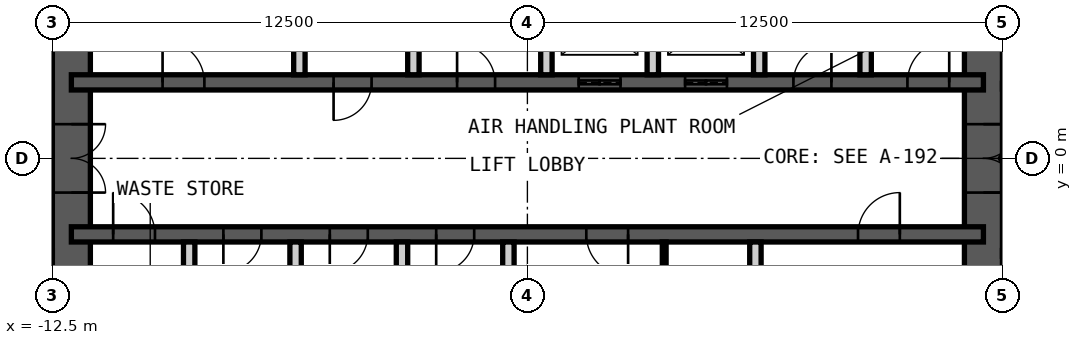
"""IFC4 building model, lengths in metres.
Left out: names, types, materials, properties, quantities, classifications, styles, units other than length and angle.
Written with IfcOpenShell. Run it as: python <this file> out.ifc"""

import sys

from ifc_helpers import new_model, si_unit, direction, frame, frame_2d, origin, place, context, subcontext, project, spatial, rectangle, extrude, element, fill, save


model = new_model("IFC4")
c1 = context("Model", 3, precision=1e-05, world=origin(), true_north=direction((0.0, 1.0)))
c2 = subcontext(c1, "Body", "Model", "MODEL_VIEW")
j1 = project(units=[si_unit("LENGTHUNIT", "METRE"), si_unit("PLANEANGLEUNIT", "RADIAN")], contexts=[c1])
p1 = place(None, origin())
s1 = spatial("IfcSite", under=j1, at=p1, CompositionType="ELEMENT")
p2 = place(p1, origin())
s2 = spatial("IfcBuilding", under=s1, at=p2, CompositionType="ELEMENT")
p3 = place(p2, frame((0.0, 0.0, 291.4)))
s3 = spatial("IfcBuildingStorey", under=s2, at=p3, CompositionType="ELEMENT", Elevation=291.4)
p4 = place(p3, frame((12.0, -9.0, 0.0), z_axis=(0.0, 0.0, 1.0), x_axis=(0.0, 1.0, 0.0)))
e1 = element("IfcWall", 1, at=p4, inside=s3, PredefinedType="SHEAR", context=c2, shape_type="SweptSolid", body=[
    extrude(rectangle(XDim=18.0, YDim=1.0, at=frame_2d((9.0, 0.0))), origin(), (0.0, 0.0, 1.0), 4.2),
])
p5 = place(p4, frame((8.1, 0.0, 0.0)))
e2 = element("IfcOpeningElement", 2, at=p5, cuts=e1, PredefinedType="OPENING", context=c2, shape_type="SweptSolid", body=[
    extrude(rectangle(XDim=1.8, YDim=2.1, at=frame_2d((0.9, 1.05))), frame((0.0, 0.51, 0.0), z_axis=(0.0, -1.0, 0.0), x_axis=(1.0, 0.0, 0.0)), (0.0, 0.0, 1.0), 1.02),
])
p6 = place(p3, frame((-12.0, -9.0, 0.0), z_axis=(0.0, 0.0, 1.0), x_axis=(0.0, 1.0, 0.0)))
e3 = element("IfcWall", 3, at=p6, inside=s3, PredefinedType="SHEAR", context=c2, shape_type="SweptSolid", body=[
    extrude(rectangle(XDim=18.0, YDim=1.0, at=frame_2d((9.0, 0.0))), origin(), (0.0, 0.0, 1.0), 4.2),
])
p7 = place(p6, frame((8.1, 0.0, 0.0)))
e4 = element("IfcOpeningElement", 4, at=p7, cuts=e3, PredefinedType="OPENING", context=c2, shape_type="SweptSolid", body=[
    extrude(rectangle(XDim=1.8, YDim=2.1, at=frame_2d((0.9, 1.05))), frame((0.0, 0.51, 0.0), z_axis=(0.0, -1.0, 0.0), x_axis=(1.0, 0.0, 0.0)), (0.0, 0.0, 1.0), 1.02),
])
p8 = place(p3, frame((-12.0, 2.0, 0.0), z_axis=(0.0, 0.0, 1.0), x_axis=(1.0, 0.0, 0.0)))
e5 = element("IfcWall", 5, at=p8, inside=s3, PredefinedType="SHEAR", context=c2, shape_type="SweptSolid", body=[
    extrude(rectangle(XDim=24.0, YDim=0.4, at=frame_2d((12.0, 0.0))), origin(), (0.0, 0.0, 1.0), 4.2),
])
p9 = place(p8, frame((2.4, 0.0, 0.0)))
e6 = element("IfcOpeningElement", 6, at=p9, cuts=e5, PredefinedType="OPENING", context=c2, shape_type="SweptSolid", body=[
    extrude(rectangle(XDim=1.1, YDim=2.1, at=frame_2d((0.55, 1.05))), frame((0.0, 0.21, 0.0), z_axis=(0.0, -1.0, 0.0), x_axis=(1.0, 0.0, 0.0)), (0.0, 0.0, 1.0), 0.42),
])
p10 = place(p8, frame((22.0, 0.0, 0.0)))
e7 = element("IfcOpeningElement", 7, at=p10, cuts=e5, PredefinedType="OPENING", context=c2, shape_type="SweptSolid", body=[
    extrude(rectangle(XDim=1.1, YDim=2.1, at=frame_2d((0.55, 1.05))), frame((0.0, 0.21, 0.0), z_axis=(0.0, -1.0, 0.0), x_axis=(1.0, 0.0, 0.0)), (0.0, 0.0, 1.0), 0.42),
])
p11 = place(p8, frame((10.15, 0.0, 0.0)))
e8 = element("IfcOpeningElement", 8, at=p11, cuts=e5, PredefinedType="OPENING", context=c2, shape_type="SweptSolid", body=[
    extrude(rectangle(XDim=1.0, YDim=2.1, at=frame_2d((0.5, 1.05))), frame((0.0, 0.21, 0.0), z_axis=(0.0, -1.0, 0.0), x_axis=(1.0, 0.0, 0.0)), (0.0, 0.0, 1.0), 0.42),
])
p12 = place(p8, frame((6.9, 0.0, 0.0)))
e9 = element("IfcOpeningElement", 9, at=p12, cuts=e5, PredefinedType="OPENING", context=c2, shape_type="SweptSolid", body=[
    extrude(rectangle(XDim=1.0, YDim=2.1, at=frame_2d((0.5, 1.05))), frame((0.0, 0.21, 0.0), z_axis=(0.0, -1.0, 0.0), x_axis=(1.0, 0.0, 0.0)), (0.0, 0.0, 1.0), 0.42),
])
p13 = place(p8, frame((13.35, 0.0, 0.0)))
e10 = element("IfcOpeningElement", 10, at=p13, cuts=e5, PredefinedType="OPENING", context=c2, shape_type="SweptSolid", body=[
    extrude(rectangle(XDim=1.1, YDim=2.4, at=frame_2d((0.55, 1.2))), frame((0.0, 0.21, 0.0), z_axis=(0.0, -1.0, 0.0), x_axis=(1.0, 0.0, 0.0)), (0.0, 0.0, 1.0), 0.42),
])
p14 = place(p8, frame((16.15, 0.0, 0.0)))
e11 = element("IfcOpeningElement", 11, at=p14, cuts=e5, PredefinedType="OPENING", context=c2, shape_type="SweptSolid", body=[
    extrude(rectangle(XDim=1.1, YDim=2.4, at=frame_2d((0.55, 1.2))), frame((0.0, 0.21, 0.0), z_axis=(0.0, -1.0, 0.0), x_axis=(1.0, 0.0, 0.0)), (0.0, 0.0, 1.0), 0.42),
])
p15 = place(p8, frame((19.0, 0.0, 0.0)))
e12 = element("IfcOpeningElement", 12, at=p15, cuts=e5, PredefinedType="OPENING", context=c2, shape_type="SweptSolid", body=[
    extrude(rectangle(XDim=1.0, YDim=2.1, at=frame_2d((0.5, 1.05))), frame((0.0, 0.21, 0.0), z_axis=(0.0, -1.0, 0.0), x_axis=(1.0, 0.0, 0.0)), (0.0, 0.0, 1.0), 0.42),
])
p16 = place(p3, frame((-12.0, -2.0, 0.0), z_axis=(0.0, 0.0, 1.0), x_axis=(1.0, 0.0, 0.0)))
e13 = element("IfcWall", 13, at=p16, inside=s3, PredefinedType="SHEAR", context=c2, shape_type="SweptSolid", body=[
    extrude(rectangle(XDim=24.0, YDim=0.4, at=frame_2d((12.0, 0.0))), origin(), (0.0, 0.0, 1.0), 4.2),
])
p17 = place(p16, frame((1.1, 0.0, 0.0)))
e14 = element("IfcOpeningElement", 14, at=p17, cuts=e13, PredefinedType="OPENING", context=c2, shape_type="SweptSolid", body=[
    extrude(rectangle(XDim=1.1, YDim=2.1, at=frame_2d((0.55, 1.05))), frame((0.0, 0.21, 0.0), z_axis=(0.0, -1.0, 0.0), x_axis=(1.0, 0.0, 0.0)), (0.0, 0.0, 1.0), 0.42),
])
p18 = place(p16, frame((13.55, 0.0, 0.0)))
e15 = element("IfcOpeningElement", 15, at=p18, cuts=e13, PredefinedType="OPENING", context=c2, shape_type="SweptSolid", body=[
    extrude(rectangle(XDim=1.1, YDim=2.1, at=frame_2d((0.55, 1.05))), frame((0.0, 0.21, 0.0), z_axis=(0.0, -1.0, 0.0), x_axis=(1.0, 0.0, 0.0)), (0.0, 0.0, 1.0), 0.42),
])
p19 = place(p16, frame((20.7, 0.0, 0.0)))
e16 = element("IfcOpeningElement", 16, at=p19, cuts=e13, PredefinedType="OPENING", context=c2, shape_type="SweptSolid", body=[
    extrude(rectangle(XDim=1.1, YDim=2.1, at=frame_2d((0.55, 1.05))), frame((0.0, 0.21, 0.0), z_axis=(0.0, -1.0, 0.0), x_axis=(1.0, 0.0, 0.0)), (0.0, 0.0, 1.0), 0.42),
])
p20 = place(p16, frame((4.0, 0.0, 0.0)))
e17 = element("IfcOpeningElement", 17, at=p20, cuts=e13, PredefinedType="OPENING", context=c2, shape_type="SweptSolid", body=[
    extrude(rectangle(XDim=1.0, YDim=2.1, at=frame_2d((0.5, 1.05))), frame((0.0, 0.21, 0.0), z_axis=(0.0, -1.0, 0.0), x_axis=(1.0, 0.0, 0.0)), (0.0, 0.0, 1.0), 0.42),
])
p21 = place(p16, frame((6.8, 0.0, 0.0)))
e18 = element("IfcOpeningElement", 18, at=p21, cuts=e13, PredefinedType="OPENING", context=c2, shape_type="SweptSolid", body=[
    extrude(rectangle(XDim=1.0, YDim=2.1, at=frame_2d((0.5, 1.05))), frame((0.0, 0.21, 0.0), z_axis=(0.0, -1.0, 0.0), x_axis=(1.0, 0.0, 0.0)), (0.0, 0.0, 1.0), 0.42),
])
p22 = place(p16, frame((9.6, 0.0, 0.0)))
e19 = element("IfcOpeningElement", 19, at=p22, cuts=e13, PredefinedType="OPENING", context=c2, shape_type="SweptSolid", body=[
    extrude(rectangle(XDim=1.0, YDim=2.1, at=frame_2d((0.5, 1.05))), frame((0.0, 0.21, 0.0), z_axis=(0.0, -1.0, 0.0), x_axis=(1.0, 0.0, 0.0)), (0.0, 0.0, 1.0), 0.42),
])
for number, where, z_axis, x_axis in (
    (20, (-6.0, 2.2, 0.0), (0.0, 0.0, 1.0), (0.0, 1.0, 0.0)),
    (21, (-3.0, 2.2, 0.0), (0.0, 0.0, 1.0), (0.0, 1.0, 0.0)),
    (22, (0.5, 2.2, 0.0), (0.0, 0.0, 1.0), (0.0, 1.0, 0.0)),
    (23, (3.3, 2.2, 0.0), (0.0, 0.0, 1.0), (0.0, 1.0, 0.0)),
    (24, (6.1, 2.2, 0.0), (0.0, 0.0, 1.0), (0.0, 1.0, 0.0)),
    (25, (8.9, 2.2, 0.0), (0.0, 0.0, 1.0), (0.0, 1.0, 0.0)),
    (26, (-8.9, -4.85, 0.0), (0.0, 0.0, 1.0), (0.0, 1.0, 0.0)),
    (27, (-6.1, -4.85, 0.0), (0.0, 0.0, 1.0), (0.0, 1.0, 0.0)),
    (28, (-3.3, -4.85, 0.0), (0.0, 0.0, 1.0), (0.0, 1.0, 0.0)),
    (29, (-0.5, -4.85, 0.0), (0.0, 0.0, 1.0), (0.0, 1.0, 0.0)),
    (30, (6.0, -4.85, 0.0), (0.0, 0.0, 1.0), (0.0, 1.0, 0.0)),
):
    element("IfcWall", number, at=place(p3, frame(where, z_axis=z_axis, x_axis=x_axis)), inside=s3, PredefinedType="PARTITIONING", context=c2, shape_type="SweptSolid", body=[
        extrude(rectangle(XDim=2.65, YDim=0.3, at=frame_2d((1.325, 0.0))), origin(), (0.0, 0.0, 1.0), 3.98),
    ])
p23 = place(p3, frame((3.6, -4.85, 0.0), z_axis=(0.0, 0.0, 1.0), x_axis=(0.0, 1.0, 0.0)))
e31 = element("IfcWall", 31, at=p23, inside=s3, PredefinedType="PARTITIONING", context=c2, shape_type="SweptSolid", body=[
    extrude(rectangle(XDim=2.65, YDim=0.1, at=frame_2d((1.325, 0.0))), origin(), (0.0, 0.0, 1.0), 3.98),
])
p24 = place(p23, frame((0.1, 0.0, 0.0)))
e32 = element("IfcOpeningElement", 32, at=p24, cuts=e31, PredefinedType="OPENING", context=c2, shape_type="SweptSolid", body=[
    extrude(rectangle(XDim=1.0, YDim=2.4, at=frame_2d((0.5, 1.2))), frame((0.0, 0.06, 0.0), z_axis=(0.0, -1.0, 0.0), x_axis=(1.0, 0.0, 0.0)), (0.0, 0.0, 1.0), 0.12),
])
p25 = place(p9, origin())
e33 = element("IfcDoor", 33, at=p25, inside=s3, OperationType="SINGLE_SWING_RIGHT", PredefinedType="DOOR", context=c2, shape_type="SweptSolid", body=[
    extrude(rectangle(XDim=1.1, YDim=2.1, at=frame_2d((0.55, 1.05))), frame((0.0, 0.025, 0.0), z_axis=(0.0, -1.0, 0.0), x_axis=(1.0, 0.0, 0.0)), (0.0, 0.0, 1.0), 0.05),
])
fill(e6, e33)
p26 = place(p17, origin())
e34 = element("IfcDoor", 34, at=p26, inside=s3, OperationType="SINGLE_SWING_RIGHT", PredefinedType="DOOR", context=c2, shape_type="SweptSolid", body=[
    extrude(rectangle(XDim=1.1, YDim=2.1, at=frame_2d((0.55, 1.05))), frame((0.0, 0.025, 0.0), z_axis=(0.0, -1.0, 0.0), x_axis=(1.0, 0.0, 0.0)), (0.0, 0.0, 1.0), 0.05),
])
fill(e14, e34)
p27 = place(p10, origin())
e35 = element("IfcDoor", 35, at=p27, inside=s3, OperationType="SINGLE_SWING_LEFT", PredefinedType="DOOR", context=c2, shape_type="SweptSolid", body=[
    extrude(rectangle(XDim=1.1, YDim=2.1, at=frame_2d((0.55, 1.05))), frame((0.0, 0.025, 0.0), z_axis=(0.0, -1.0, 0.0), x_axis=(1.0, 0.0, 0.0)), (0.0, 0.0, 1.0), 0.05),
])
fill(e7, e35)
p28 = place(p11, origin())
e36 = element("IfcDoor", 36, at=p28, inside=s3, OperationType="SINGLE_SWING_RIGHT", PredefinedType="DOOR", context=c2, shape_type="SweptSolid", body=[
    extrude(rectangle(XDim=1.0, YDim=2.1, at=frame_2d((0.5, 1.05))), frame((0.0, 0.025, 0.0), z_axis=(0.0, -1.0, 0.0), x_axis=(1.0, 0.0, 0.0)), (0.0, 0.0, 1.0), 0.05),
])
fill(e8, e36)
p29 = place(p18, origin())
e37 = element("IfcDoor", 37, at=p29, inside=s3, OperationType="SINGLE_SWING_RIGHT", PredefinedType="DOOR", context=c2, shape_type="SweptSolid", body=[
    extrude(rectangle(XDim=1.1, YDim=2.1, at=frame_2d((0.55, 1.05))), frame((0.0, 0.025, 0.0), z_axis=(0.0, -1.0, 0.0), x_axis=(1.0, 0.0, 0.0)), (0.0, 0.0, 1.0), 0.05),
])
fill(e15, e37)
p30 = place(p19, origin())
e38 = element("IfcDoor", 38, at=p30, inside=s3, OperationType="SINGLE_SWING_LEFT", PredefinedType="DOOR", context=c2, shape_type="SweptSolid", body=[
    extrude(rectangle(XDim=1.1, YDim=2.1, at=frame_2d((0.55, 1.05))), frame((0.0, 0.025, 0.0), z_axis=(0.0, -1.0, 0.0), x_axis=(1.0, 0.0, 0.0)), (0.0, 0.0, 1.0), 0.05),
])
fill(e16, e38)
p31 = place(p5, origin())
e39 = element("IfcDoor", 39, at=p31, inside=s3, OperationType="DOUBLE_DOOR_DOUBLE_SWING", PredefinedType="DOOR", context=c2, shape_type="SweptSolid", body=[
    extrude(rectangle(XDim=1.8, YDim=2.1, at=frame_2d((0.9, 1.05))), frame((0.0, 0.025, 0.0), z_axis=(0.0, -1.0, 0.0), x_axis=(1.0, 0.0, 0.0)), (0.0, 0.0, 1.0), 0.05),
])
fill(e2, e39)
p32 = place(p7, origin())
e40 = element("IfcDoor", 40, at=p32, inside=s3, OperationType="DOUBLE_DOOR_DOUBLE_SWING", PredefinedType="DOOR", context=c2, shape_type="SweptSolid", body=[
    extrude(rectangle(XDim=1.8, YDim=2.1, at=frame_2d((0.9, 1.05))), frame((0.0, 0.025, 0.0), z_axis=(0.0, -1.0, 0.0), x_axis=(1.0, 0.0, 0.0)), (0.0, 0.0, 1.0), 0.05),
])
fill(e4, e40)
p33 = place(p12, origin())
e41 = element("IfcDoor", 41, at=p33, inside=s3, OperationType="SINGLE_SWING_LEFT", PredefinedType="DOOR", context=c2, shape_type="SweptSolid", body=[
    extrude(rectangle(XDim=1.0, YDim=2.1, at=frame_2d((0.5, 1.05))), frame((0.0, 0.025, 0.0), z_axis=(0.0, -1.0, 0.0), x_axis=(1.0, 0.0, 0.0)), (0.0, 0.0, 1.0), 0.05),
])
fill(e9, e41)
p34 = place(p13, origin())
e42 = element("IfcDoor", 42, at=p34, inside=s3, OperationType="DOUBLE_DOOR_SLIDING", PredefinedType="DOOR", context=c2, shape_type="SweptSolid", body=[
    extrude(rectangle(XDim=1.1, YDim=2.4, at=frame_2d((0.55, 1.2))), frame((0.0, 0.025, 0.0), z_axis=(0.0, -1.0, 0.0), x_axis=(1.0, 0.0, 0.0)), (0.0, 0.0, 1.0), 0.05),
])
fill(e10, e42)
p35 = place(p14, origin())
e43 = element("IfcDoor", 43, at=p35, inside=s3, OperationType="DOUBLE_DOOR_SLIDING", PredefinedType="DOOR", context=c2, shape_type="SweptSolid", body=[
    extrude(rectangle(XDim=1.1, YDim=2.4, at=frame_2d((0.55, 1.2))), frame((0.0, 0.025, 0.0), z_axis=(0.0, -1.0, 0.0), x_axis=(1.0, 0.0, 0.0)), (0.0, 0.0, 1.0), 0.05),
])
fill(e11, e43)
p36 = place(p15, origin())
e44 = element("IfcDoor", 44, at=p36, inside=s3, OperationType="SINGLE_SWING_LEFT", PredefinedType="DOOR", context=c2, shape_type="SweptSolid", body=[
    extrude(rectangle(XDim=1.0, YDim=2.1, at=frame_2d((0.5, 1.05))), frame((0.0, 0.025, 0.0), z_axis=(0.0, -1.0, 0.0), x_axis=(1.0, 0.0, 0.0)), (0.0, 0.0, 1.0), 0.05),
])
fill(e12, e44)
p37 = place(p20, origin())
e45 = element("IfcDoor", 45, at=p37, inside=s3, OperationType="SINGLE_SWING_LEFT", PredefinedType="DOOR", context=c2, shape_type="SweptSolid", body=[
    extrude(rectangle(XDim=1.0, YDim=2.1, at=frame_2d((0.5, 1.05))), frame((0.0, 0.025, 0.0), z_axis=(0.0, -1.0, 0.0), x_axis=(1.0, 0.0, 0.0)), (0.0, 0.0, 1.0), 0.05),
])
fill(e17, e45)
p38 = place(p21, origin())
e46 = element("IfcDoor", 46, at=p38, inside=s3, OperationType="SINGLE_SWING_LEFT", PredefinedType="DOOR", context=c2, shape_type="SweptSolid", body=[
    extrude(rectangle(XDim=1.0, YDim=2.1, at=frame_2d((0.5, 1.05))), frame((0.0, 0.025, 0.0), z_axis=(0.0, -1.0, 0.0), x_axis=(1.0, 0.0, 0.0)), (0.0, 0.0, 1.0), 0.05),
])
fill(e18, e46)
p39 = place(p22, origin())
e47 = element("IfcDoor", 47, at=p39, inside=s3, OperationType="SINGLE_SWING_LEFT", PredefinedType="DOOR", context=c2, shape_type="SweptSolid", body=[
    extrude(rectangle(XDim=1.0, YDim=2.1, at=frame_2d((0.5, 1.05))), frame((0.0, 0.025, 0.0), z_axis=(0.0, -1.0, 0.0), x_axis=(1.0, 0.0, 0.0)), (0.0, 0.0, 1.0), 0.05),
])
fill(e19, e47)
save(model, sys.argv[1])
